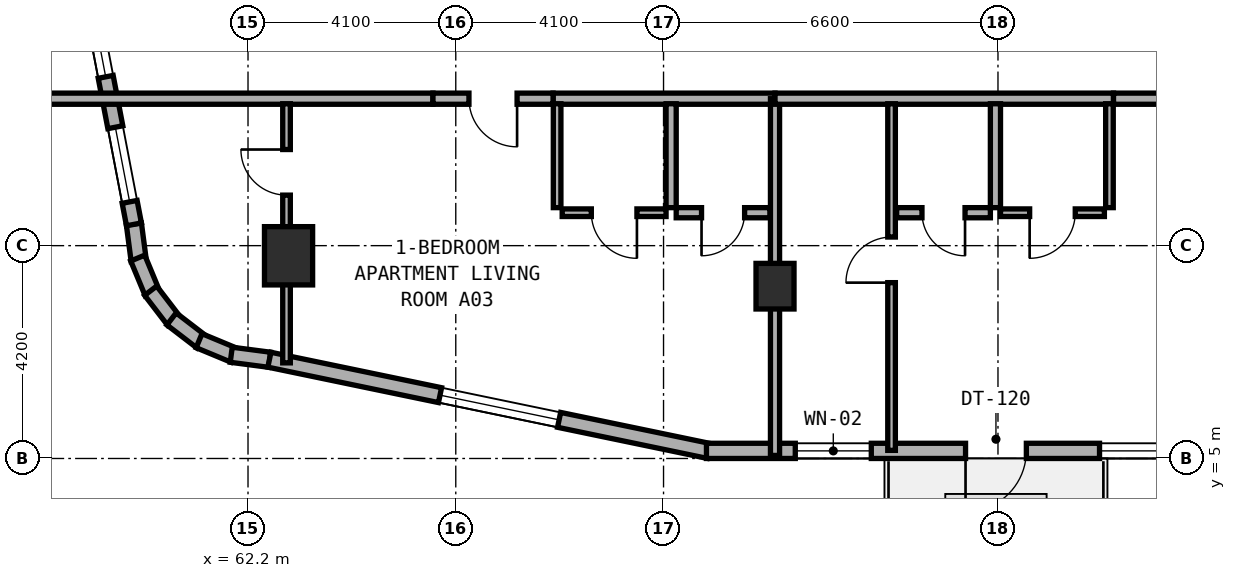
"""IFC4 building model, lengths in metres.
Left out: names, types, materials, properties, quantities, classifications, styles, units other than length and angle.
Written with IfcOpenShell. Run it as: python <this file> out.ifc"""

import sys

from ifc_helpers import new_model, si_unit, direction, frame, frame_2d, origin, origin_2d, place, context, subcontext, project, spatial, rectangle, extrude, element, fill, save


model = new_model("IFC4")
c1 = context("Model", 3, precision=1e-05, world=origin(), true_north=direction((0.0, 1.0)))
c2 = subcontext(c1, "Body", "Model", "MODEL_VIEW")
j1 = project(units=[si_unit("LENGTHUNIT", "METRE"), si_unit("PLANEANGLEUNIT", "RADIAN")], contexts=[c1])
p1 = place(None, origin())
s1 = spatial("IfcSite", under=j1, at=p1, CompositionType="ELEMENT")
p2 = place(p1, origin())
s2 = spatial("IfcBuilding", under=s1, at=p2, CompositionType="ELEMENT")
p3 = place(p2, frame((0.0, 0.0, 69.5)))
s3 = spatial("IfcBuildingStorey", under=s2, at=p3, CompositionType="ELEMENT", Elevation=69.5)
p4 = place(p3, frame((72.6, 8.4, 0.0), z_axis=(0.0, 0.0, 1.0), x_axis=(1.0, 0.0, 0.0)))
e1 = element("IfcColumn", 1, at=p4, inside=s3, PredefinedType="COLUMN", context=c2, shape_type="SweptSolid", body=[
    extrude(rectangle(XDim=0.75, YDim=0.9, at=origin_2d()), origin(), (0.0, 0.0, 1.0), 3.5),
])
p5 = place(p3, frame((63.0, 9.0, 0.0), z_axis=(0.0, 0.0, 1.0), x_axis=(1.0, 0.0, 0.0)))
e2 = element("IfcColumn", 2, at=p5, inside=s3, PredefinedType="COLUMN", context=c2, shape_type="SweptSolid", body=[
    extrude(rectangle(XDim=0.95, YDim=1.15, at=origin_2d()), origin(), (0.0, 0.0, 1.0), 3.5),
])
p6 = place(p3, frame((59.948, 9.627, 0.0), z_axis=(0.0, 0.0, 1.0), x_axis=(0.130255288807, -0.991480488834, 0.0)))
e3 = element("IfcWall", 3, at=p6, inside=s3, PredefinedType="STANDARD", context=c2, shape_type="SweptSolid", body=[
    extrude(rectangle(XDim=0.729, YDim=0.3, at=frame_2d((0.365, 0.0))), origin(), (0.0, 0.0, 1.0), 3.25),
])
for number, where, z_axis, x_axis in (
    (4, (60.024, 8.955, 0.0), (0.0, 0.0, 1.0), (0.384, -0.924, 0.0)),
    (5, (60.279, 8.311, 0.0), (0.0, 0.0, 1.0), (0.608, -0.794, 0.0)),
    (6, (60.691, 7.754, 0.0), (0.0, 0.0, 1.0), (0.794, -0.608, 0.0)),
    (7, (61.234, 7.324, 0.0), (0.0, 0.0, 1.0), (0.924, -0.383, 0.0)),
):
    element("IfcWall", number, at=place(p3, frame(where, z_axis=z_axis, x_axis=x_axis)), inside=s3, PredefinedType="STANDARD", context=c2, shape_type="SweptSolid", body=[
        extrude(rectangle(XDim=0.746, YDim=0.3, at=frame_2d((0.373, 0.0))), origin(), (0.0, 0.0, 1.0), 3.25),
    ])
p7 = place(p3, frame((61.869, 7.047, 0.0), z_axis=(0.0, 0.0, 1.0), x_axis=(0.991559404866, -0.129653178221, 0.0)))
e8 = element("IfcWall", 8, at=p7, inside=s3, PredefinedType="STANDARD", context=c2, shape_type="SweptSolid", body=[
    extrude(rectangle(XDim=0.764, YDim=0.3, at=frame_2d((0.382, 0.0))), origin(), (0.0, 0.0, 1.0), 3.25),
])
p8 = place(p3, frame((62.622, 6.949, 0.0), z_axis=(0.0, 0.0, 1.0), x_axis=(0.979119654102, -0.203284782882, 0.0)))
e9 = element("IfcWall", 9, at=p8, inside=s3, PredefinedType="STANDARD", context=c2, shape_type="SweptSolid", body=[
    extrude(rectangle(XDim=8.855, YDim=0.3, at=frame_2d((4.427, 0.0))), origin(), (0.0, 0.0, 1.0), 3.25),
])
p9 = place(p8, frame((3.439, 0.0, 0.8)))
e10 = element("IfcOpeningElement", 10, at=p9, cuts=e9, PredefinedType="OPENING", context=c2, shape_type="SweptSolid", body=[
    extrude(rectangle(XDim=2.4, YDim=1.6, at=frame_2d((1.2, 0.8))), frame((0.0, 0.16, 0.0), z_axis=(0.0, -1.0, 0.0), x_axis=(1.0, 0.0, 0.0)), (0.0, 0.0, 1.0), 0.32),
])
p10 = place(p3, frame((71.247, 5.15, 0.0), z_axis=(0.0, 0.0, 1.0), x_axis=(1.0, 0.0, 0.0)))
e11 = element("IfcWall", 11, at=p10, inside=s3, PredefinedType="STANDARD", context=c2, shape_type="SweptSolid", body=[
    extrude(rectangle(XDim=11.391, YDim=0.3, at=frame_2d((5.695, 0.0))), origin(), (0.0, 0.0, 1.0), 3.25),
])
p11 = place(p10, frame((5.113, 0.0, 0.0)))
e12 = element("IfcOpeningElement", 12, at=p11, cuts=e11, PredefinedType="OPENING", context=c2, shape_type="SweptSolid", body=[
    extrude(rectangle(XDim=1.2, YDim=2.15, at=frame_2d((0.6, 1.075))), frame((0.0, 0.16, 0.0), z_axis=(0.0, -1.0, 0.0), x_axis=(1.0, 0.0, 0.0)), (0.0, 0.0, 1.0), 0.32),
])
p12 = place(p10, frame((1.753, 0.0, 0.85)))
e13 = element("IfcOpeningElement", 13, at=p12, cuts=e11, PredefinedType="OPENING", context=c2, shape_type="SweptSolid", body=[
    extrude(rectangle(XDim=1.5, YDim=1.5, at=frame_2d((0.75, 0.75))), frame((0.0, 0.16, 0.0), z_axis=(0.0, -1.0, 0.0), x_axis=(1.0, 0.0, 0.0)), (0.0, 0.0, 1.0), 0.32),
])
p13 = place(p10, frame((7.757, 0.0, 0.8)))
e14 = element("IfcOpeningElement", 14, at=p13, cuts=e11, PredefinedType="OPENING", context=c2, shape_type="SweptSolid", body=[
    extrude(rectangle(XDim=2.4, YDim=1.6, at=frame_2d((1.2, 0.8))), frame((0.0, 0.16, 0.0), z_axis=(0.0, -1.0, 0.0), x_axis=(1.0, 0.0, 0.0)), (0.0, 0.0, 1.0), 0.32),
])
p14 = place(p3, frame((58.137, 19.082, 0.0), z_axis=(0.0, 0.0, 1.0), x_axis=(0.188087874316, -0.982152203854, 0.0)))
e15 = element("IfcWall", 15, at=p14, inside=s3, PredefinedType="STANDARD", context=c2, shape_type="SweptSolid", body=[
    extrude(rectangle(XDim=9.634, YDim=0.3, at=frame_2d((4.817, 0.0))), origin(), (0.0, 0.0, 1.0), 3.25),
])
p15 = place(p14, frame((1.255, 0.0, 0.8)))
e16 = element("IfcOpeningElement", 16, at=p15, cuts=e15, PredefinedType="OPENING", context=c2, shape_type="SweptSolid", body=[
    extrude(rectangle(XDim=2.4, YDim=1.6, at=frame_2d((1.2, 0.8))), frame((0.0, 0.16, 0.0), z_axis=(0.0, -1.0, 0.0), x_axis=(1.0, 0.0, 0.0)), (0.0, 0.0, 1.0), 0.32),
])
p16 = place(p14, frame((5.47, 0.0, 0.85)))
e17 = element("IfcOpeningElement", 17, at=p16, cuts=e15, PredefinedType="OPENING", context=c2, shape_type="SweptSolid", body=[
    extrude(rectangle(XDim=1.2, YDim=1.5, at=frame_2d((0.6, 0.75))), frame((0.0, 0.16, 0.0), z_axis=(0.0, -1.0, 0.0), x_axis=(1.0, 0.0, 0.0)), (0.0, 0.0, 1.0), 0.32),
])
p17 = place(p14, frame((7.682, 0.0, 0.85)))
e18 = element("IfcOpeningElement", 18, at=p17, cuts=e15, PredefinedType="OPENING", context=c2, shape_type="SweptSolid", body=[
    extrude(rectangle(XDim=1.5, YDim=1.5, at=frame_2d((0.75, 0.75))), frame((0.0, 0.16, 0.0), z_axis=(0.0, -1.0, 0.0), x_axis=(1.0, 0.0, 0.0)), (0.0, 0.0, 1.0), 0.32),
])
p18 = place(p3, frame((58.16, 12.1, 0.0), z_axis=(0.0, 0.0, 1.0), x_axis=(1.0, 0.0, 0.0)))
e19 = element("IfcWall", 19, at=p18, inside=s3, PredefinedType="SOLIDWALL", context=c2, shape_type="SweptSolid", body=[
    extrude(rectangle(XDim=7.69, YDim=0.22, at=frame_2d((3.845, 0.0))), origin(), (0.0, 0.0, 1.0), 2.865),
])
p19 = place(p3, frame((68.22, 12.1, 0.0), z_axis=(0.0, 0.0, 1.0), x_axis=(1.0, 0.0, 0.0)))
e20 = element("IfcWall", 20, at=p19, inside=s3, PredefinedType="SOLIDWALL", context=c2, shape_type="SweptSolid", body=[
    extrude(rectangle(XDim=4.38, YDim=0.22, at=frame_2d((2.19, 0.0))), origin(), (0.0, 0.0, 1.0), 2.725),
])
p20 = place(p3, frame((65.85, 12.1, 0.0), z_axis=(0.0, 0.0, 1.0), x_axis=(1.0, 0.0, 0.0)))
e21 = element("IfcWall", 21, at=p20, inside=s3, PredefinedType="SOLIDWALL", context=c2, shape_type="SweptSolid", body=[
    extrude(rectangle(XDim=2.37, YDim=0.22, at=frame_2d((1.185, 0.0))), origin(), (0.0, 0.0, 1.0), 3.22),
])
p21 = place(p20, frame((0.71, 0.0, 0.0)))
e22 = element("IfcOpeningElement", 22, at=p21, cuts=e21, PredefinedType="OPENING", context=c2, shape_type="SweptSolid", body=[
    extrude(rectangle(XDim=0.95, YDim=2.1, at=frame_2d((0.475, 1.05))), frame((0.0, 0.12, 0.0), z_axis=(0.0, -1.0, 0.0), x_axis=(1.0, 0.0, 0.0)), (0.0, 0.0, 1.0), 0.24),
])
p22 = place(p3, frame((62.96, 6.887, 0.0), z_axis=(0.0, 0.0, 1.0), x_axis=(0.0, 1.0, 0.0)))
e23 = element("IfcWall", 23, at=p22, inside=s3, PredefinedType="PARTITIONING", context=c2, shape_type="SweptSolid", body=[
    extrude(rectangle(XDim=5.113, YDim=0.15, at=frame_2d((2.557, 0.0))), origin(), (0.0, 0.0, 1.0), 2.865),
])
p23 = place(p22, frame((3.31, 0.0, 0.0)))
e24 = element("IfcOpeningElement", 24, at=p23, cuts=e23, PredefinedType="OPENING", context=c2, shape_type="SweptSolid", body=[
    extrude(rectangle(XDim=0.9, YDim=2.1, at=frame_2d((0.45, 1.05))), frame((0.0, 0.085, 0.0), z_axis=(0.0, -1.0, 0.0), x_axis=(1.0, 0.0, 0.0)), (0.0, 0.0, 1.0), 0.17),
])
p24 = place(p3, frame((70.55, 9.95, 0.0), z_axis=(0.0, 0.0, 1.0), x_axis=(0.0, 1.0, 0.0)))
e25 = element("IfcWall", 25, at=p24, inside=s3, PredefinedType="PLUMBINGWALL", context=c2, shape_type="SweptSolid", body=[
    extrude(rectangle(XDim=2.05, YDim=0.2, at=frame_2d((1.025, 0.0))), origin(), (0.0, 0.0, 1.0), 3.22),
])
p25 = place(p3, frame((68.3, 9.95, 0.0), z_axis=(0.0, 0.0, 1.0), x_axis=(0.0, 1.0, 0.0)))
e26 = element("IfcWall", 26, at=p25, inside=s3, PredefinedType="PARTITIONING", context=c2, shape_type="SweptSolid", body=[
    extrude(rectangle(XDim=2.05, YDim=0.15, at=frame_2d((1.025, 0.0))), origin(), (0.0, 0.0, 1.0), 3.22),
])
p26 = place(p3, frame((70.65, 9.85, 0.0), z_axis=(0.0, 0.0, 1.0), x_axis=(1.0, 0.0, 0.0)))
e27 = element("IfcWall", 27, at=p26, inside=s3, PredefinedType="PLUMBINGWALL", context=c2, shape_type="SweptSolid", body=[
    extrude(rectangle(XDim=1.85, YDim=0.2, at=frame_2d((0.925, 0.0))), origin(), (0.0, 0.0, 1.0), 3.22),
])
p27 = place(p26, frame((0.5, 0.0, 0.0)))
e28 = element("IfcOpeningElement", 28, at=p27, cuts=e27, PredefinedType="OPENING", context=c2, shape_type="SweptSolid", body=[
    extrude(rectangle(XDim=0.85, YDim=2.1, at=frame_2d((0.425, 1.05))), frame((0.0, 0.11, 0.0), z_axis=(0.0, -1.0, 0.0), x_axis=(1.0, 0.0, 0.0)), (0.0, 0.0, 1.0), 0.22),
])
p28 = place(p3, frame((68.4, 9.85, 0.0), z_axis=(0.0, 0.0, 1.0), x_axis=(1.0, 0.0, 0.0)))
e29 = element("IfcWall", 29, at=p28, inside=s3, PredefinedType="PARTITIONING", context=c2, shape_type="SweptSolid", body=[
    extrude(rectangle(XDim=2.05, YDim=0.15, at=frame_2d((1.025, 0.0))), origin(), (0.0, 0.0, 1.0), 3.22),
])
p29 = place(p28, frame((0.575, 0.0, 0.0)))
e30 = element("IfcOpeningElement", 30, at=p29, cuts=e29, PredefinedType="OPENING", context=c2, shape_type="SweptSolid", body=[
    extrude(rectangle(XDim=0.9, YDim=2.1, at=frame_2d((0.45, 1.05))), frame((0.0, 0.085, 0.0), z_axis=(0.0, -1.0, 0.0), x_axis=(1.0, 0.0, 0.0)), (0.0, 0.0, 1.0), 0.17),
])
p30 = place(p3, frame((72.6, 5.06, 0.0), z_axis=(0.0, 0.0, 1.0), x_axis=(0.0, 1.0, 0.0)))
e31 = element("IfcWall", 31, at=p30, inside=s3, PredefinedType="SOLIDWALL", context=c2, shape_type="SweptSolid", body=[
    extrude(rectangle(XDim=7.04, YDim=0.18, at=frame_2d((3.52, 0.0))), origin(), (0.0, 0.0, 1.0), 2.725),
])
p31 = place(p3, frame((72.6, 12.1, 0.0), z_axis=(0.0, 0.0, 1.0), x_axis=(1.0, 0.0, 0.0)))
e32 = element("IfcWall", 32, at=p31, inside=s3, PredefinedType="SOLIDWALL", context=c2, shape_type="SweptSolid", body=[
    extrude(rectangle(XDim=6.68, YDim=0.22, at=frame_2d((3.34, 0.0))), origin(), (0.0, 0.0, 1.0), 2.725),
])
p32 = place(p3, frame((79.28, 12.1, 0.0), z_axis=(0.0, 0.0, 1.0), x_axis=(1.0, 0.0, 0.0)))
e33 = element("IfcWall", 33, at=p32, inside=s3, PredefinedType="SOLIDWALL", context=c2, shape_type="SweptSolid", body=[
    extrude(rectangle(XDim=9.07, YDim=0.22, at=frame_2d((4.535, 0.0))), origin(), (0.0, 0.0, 1.0), 2.725),
])
p33 = place(p32, frame((4.06, 0.0, 0.0)))
e34 = element("IfcOpeningElement", 34, at=p33, cuts=e33, PredefinedType="OPENING", context=c2, shape_type="SweptSolid", body=[
    extrude(rectangle(XDim=0.95, YDim=2.1, at=frame_2d((0.475, 1.05))), frame((0.0, 0.12, 0.0), z_axis=(0.0, -1.0, 0.0), x_axis=(1.0, 0.0, 0.0)), (0.0, 0.0, 1.0), 0.24),
])
p34 = place(p3, frame((74.9, 5.16, 0.0), z_axis=(0.0, 0.0, 1.0), x_axis=(0.0, 1.0, 0.0)))
e35 = element("IfcWall", 35, at=p34, inside=s3, PredefinedType="PARTITIONING", context=c2, shape_type="SweptSolid", body=[
    extrude(rectangle(XDim=6.84, YDim=0.15, at=frame_2d((3.42, 0.0))), origin(), (0.0, 0.0, 1.0), 2.865),
])
p35 = place(p34, frame((3.31, 0.0, 0.0)))
e36 = element("IfcOpeningElement", 36, at=p35, cuts=e35, PredefinedType="OPENING", context=c2, shape_type="SweptSolid", body=[
    extrude(rectangle(XDim=0.9, YDim=2.1, at=frame_2d((0.45, 1.05))), frame((0.0, 0.085, 0.0), z_axis=(0.0, -1.0, 0.0), x_axis=(1.0, 0.0, 0.0)), (0.0, 0.0, 1.0), 0.17),
])
p36 = place(p3, frame((76.95, 9.95, 0.0), z_axis=(0.0, 0.0, 1.0), x_axis=(0.0, 1.0, 0.0)))
e37 = element("IfcWall", 37, at=p36, inside=s3, PredefinedType="PLUMBINGWALL", context=c2, shape_type="SweptSolid", body=[
    extrude(rectangle(XDim=2.05, YDim=0.2, at=frame_2d((1.025, 0.0))), origin(), (0.0, 0.0, 1.0), 2.955),
])
p37 = place(p3, frame((79.2, 9.95, 0.0), z_axis=(0.0, 0.0, 1.0), x_axis=(0.0, 1.0, 0.0)))
e38 = element("IfcWall", 38, at=p37, inside=s3, PredefinedType="PARTITIONING", context=c2, shape_type="SweptSolid", body=[
    extrude(rectangle(XDim=2.05, YDim=0.15, at=frame_2d((1.025, 0.0))), origin(), (0.0, 0.0, 1.0), 2.955),
])
p38 = place(p3, frame((75.0, 9.85, 0.0), z_axis=(0.0, 0.0, 1.0), x_axis=(1.0, 0.0, 0.0)))
e39 = element("IfcWall", 39, at=p38, inside=s3, PredefinedType="PLUMBINGWALL", context=c2, shape_type="SweptSolid", body=[
    extrude(rectangle(XDim=1.85, YDim=0.2, at=frame_2d((0.925, 0.0))), origin(), (0.0, 0.0, 1.0), 3.22),
])
p39 = place(p38, frame((0.5, 0.0, 0.0)))
e40 = element("IfcOpeningElement", 40, at=p39, cuts=e39, PredefinedType="OPENING", context=c2, shape_type="SweptSolid", body=[
    extrude(rectangle(XDim=0.85, YDim=2.1, at=frame_2d((0.425, 1.05))), frame((0.0, 0.11, 0.0), z_axis=(0.0, -1.0, 0.0), x_axis=(1.0, 0.0, 0.0)), (0.0, 0.0, 1.0), 0.22),
])
p40 = place(p3, frame((77.05, 9.85, 0.0), z_axis=(0.0, 0.0, 1.0), x_axis=(1.0, 0.0, 0.0)))
e41 = element("IfcWall", 41, at=p40, inside=s3, PredefinedType="PARTITIONING", context=c2, shape_type="SweptSolid", body=[
    extrude(rectangle(XDim=2.05, YDim=0.15, at=frame_2d((1.025, 0.0))), origin(), (0.0, 0.0, 1.0), 3.22),
])
p41 = place(p40, frame((0.575, 0.0, 0.0)))
e42 = element("IfcOpeningElement", 42, at=p41, cuts=e41, PredefinedType="OPENING", context=c2, shape_type="SweptSolid", body=[
    extrude(rectangle(XDim=0.9, YDim=2.1, at=frame_2d((0.45, 1.05))), frame((0.0, 0.085, 0.0), z_axis=(0.0, -1.0, 0.0), x_axis=(1.0, 0.0, 0.0)), (0.0, 0.0, 1.0), 0.17),
])
p42 = place(p9, origin())
e43 = element("IfcWindow", 43, at=p42, inside=s3, PartitioningType="SINGLE_PANEL", PredefinedType="WINDOW", context=c2, shape_type="SweptSolid", body=[
    extrude(rectangle(XDim=2.4, YDim=1.6, at=frame_2d((1.2, 0.8))), frame((0.0, 0.03, 0.0), z_axis=(0.0, -1.0, 0.0), x_axis=(1.0, 0.0, 0.0)), (0.0, 0.0, 1.0), 0.06),
])
fill(e10, e43)
p43 = place(p11, frame((1.2, 0.0, 0.0), z_axis=(0.0, 0.0, 1.0), x_axis=(-1.0, 0.0, 0.0)))
e44 = element("IfcDoor", 44, at=p43, inside=s3, OperationType="SINGLE_SWING_RIGHT", PredefinedType="DOOR", context=c2, shape_type="SweptSolid", body=[
    extrude(rectangle(XDim=1.2, YDim=2.15, at=frame_2d((0.6, 1.075))), frame((0.0, 0.025, 0.0), z_axis=(0.0, -1.0, 0.0), x_axis=(1.0, 0.0, 0.0)), (0.0, 0.0, 1.0), 0.05),
])
fill(e12, e44)
p44 = place(p12, origin())
e45 = element("IfcWindow", 45, at=p44, inside=s3, PartitioningType="SINGLE_PANEL", PredefinedType="WINDOW", context=c2, shape_type="SweptSolid", body=[
    extrude(rectangle(XDim=1.5, YDim=1.5, at=frame_2d((0.75, 0.75))), frame((0.0, 0.03, 0.0), z_axis=(0.0, -1.0, 0.0), x_axis=(1.0, 0.0, 0.0)), (0.0, 0.0, 1.0), 0.06),
])
fill(e13, e45)
p45 = place(p13, origin())
e46 = element("IfcWindow", 46, at=p45, inside=s3, PartitioningType="SINGLE_PANEL", PredefinedType="WINDOW", context=c2, shape_type="SweptSolid", body=[
    extrude(rectangle(XDim=2.4, YDim=1.6, at=frame_2d((1.2, 0.8))), frame((0.0, 0.03, 0.0), z_axis=(0.0, -1.0, 0.0), x_axis=(1.0, 0.0, 0.0)), (0.0, 0.0, 1.0), 0.06),
])
fill(e14, e46)
p46 = place(p16, origin())
e47 = element("IfcWindow", 47, at=p46, inside=s3, PartitioningType="SINGLE_PANEL", PredefinedType="WINDOW", context=c2, shape_type="SweptSolid", body=[
    extrude(rectangle(XDim=1.2, YDim=1.5, at=frame_2d((0.6, 0.75))), frame((0.0, 0.03, 0.0), z_axis=(0.0, -1.0, 0.0), x_axis=(1.0, 0.0, 0.0)), (0.0, 0.0, 1.0), 0.06),
])
fill(e17, e47)
p47 = place(p17, origin())
e48 = element("IfcWindow", 48, at=p47, inside=s3, PartitioningType="SINGLE_PANEL", PredefinedType="WINDOW", context=c2, shape_type="SweptSolid", body=[
    extrude(rectangle(XDim=1.5, YDim=1.5, at=frame_2d((0.75, 0.75))), frame((0.0, 0.03, 0.0), z_axis=(0.0, -1.0, 0.0), x_axis=(1.0, 0.0, 0.0)), (0.0, 0.0, 1.0), 0.06),
])
fill(e18, e48)
p48 = place(p21, frame((0.95, 0.0, 0.0), z_axis=(0.0, 0.0, 1.0), x_axis=(-1.0, 0.0, 0.0)))
e49 = element("IfcDoor", 49, at=p48, inside=s3, OperationType="SINGLE_SWING_LEFT", PredefinedType="DOOR", context=c2, shape_type="SweptSolid", body=[
    extrude(rectangle(XDim=0.95, YDim=2.1, at=frame_2d((0.475, 1.05))), frame((0.0, 0.025, 0.0), z_axis=(0.0, -1.0, 0.0), x_axis=(1.0, 0.0, 0.0)), (0.0, 0.0, 1.0), 0.05),
])
fill(e22, e49)
p49 = place(p23, origin())
e50 = element("IfcDoor", 50, at=p49, inside=s3, OperationType="SINGLE_SWING_RIGHT", PredefinedType="DOOR", context=c2, shape_type="SweptSolid", body=[
    extrude(rectangle(XDim=0.9, YDim=2.1, at=frame_2d((0.45, 1.05))), frame((0.0, 0.025, 0.0), z_axis=(0.0, -1.0, 0.0), x_axis=(1.0, 0.0, 0.0)), (0.0, 0.0, 1.0), 0.05),
])
fill(e24, e50)
p50 = place(p27, frame((0.85, 0.0, 0.0), z_axis=(0.0, 0.0, 1.0), x_axis=(-1.0, 0.0, 0.0)))
e51 = element("IfcDoor", 51, at=p50, inside=s3, OperationType="SINGLE_SWING_RIGHT", PredefinedType="DOOR", context=c2, shape_type="SweptSolid", body=[
    extrude(rectangle(XDim=0.85, YDim=2.1, at=frame_2d((0.425, 1.05))), frame((0.0, 0.025, 0.0), z_axis=(0.0, -1.0, 0.0), x_axis=(1.0, 0.0, 0.0)), (0.0, 0.0, 1.0), 0.05),
])
fill(e28, e51)
p51 = place(p29, frame((0.9, 0.0, 0.0), z_axis=(0.0, 0.0, 1.0), x_axis=(-1.0, 0.0, 0.0)))
e52 = element("IfcDoor", 52, at=p51, inside=s3, OperationType="SINGLE_SWING_LEFT", PredefinedType="DOOR", context=c2, shape_type="SweptSolid", body=[
    extrude(rectangle(XDim=0.9, YDim=2.1, at=frame_2d((0.45, 1.05))), frame((0.0, 0.025, 0.0), z_axis=(0.0, -1.0, 0.0), x_axis=(1.0, 0.0, 0.0)), (0.0, 0.0, 1.0), 0.05),
])
fill(e30, e52)
p52 = place(p35, origin())
e53 = element("IfcDoor", 53, at=p52, inside=s3, OperationType="SINGLE_SWING_LEFT", PredefinedType="DOOR", context=c2, shape_type="SweptSolid", body=[
    extrude(rectangle(XDim=0.9, YDim=2.1, at=frame_2d((0.45, 1.05))), frame((0.0, 0.025, 0.0), z_axis=(0.0, -1.0, 0.0), x_axis=(1.0, 0.0, 0.0)), (0.0, 0.0, 1.0), 0.05),
])
fill(e36, e53)
p53 = place(p39, frame((0.85, 0.0, 0.0), z_axis=(0.0, 0.0, 1.0), x_axis=(-1.0, 0.0, 0.0)))
e54 = element("IfcDoor", 54, at=p53, inside=s3, OperationType="SINGLE_SWING_LEFT", PredefinedType="DOOR", context=c2, shape_type="SweptSolid", body=[
    extrude(rectangle(XDim=0.85, YDim=2.1, at=frame_2d((0.425, 1.05))), frame((0.0, 0.025, 0.0), z_axis=(0.0, -1.0, 0.0), x_axis=(1.0, 0.0, 0.0)), (0.0, 0.0, 1.0), 0.05),
])
fill(e40, e54)
p54 = place(p41, frame((0.9, 0.0, 0.0), z_axis=(0.0, 0.0, 1.0), x_axis=(-1.0, 0.0, 0.0)))
e55 = element("IfcDoor", 55, at=p54, inside=s3, OperationType="SINGLE_SWING_RIGHT", PredefinedType="DOOR", context=c2, shape_type="SweptSolid", body=[
    extrude(rectangle(XDim=0.9, YDim=2.1, at=frame_2d((0.45, 1.05))), frame((0.0, 0.025, 0.0), z_axis=(0.0, -1.0, 0.0), x_axis=(1.0, 0.0, 0.0)), (0.0, 0.0, 1.0), 0.05),
])
fill(e42, e55)
save(model, sys.argv[1])
